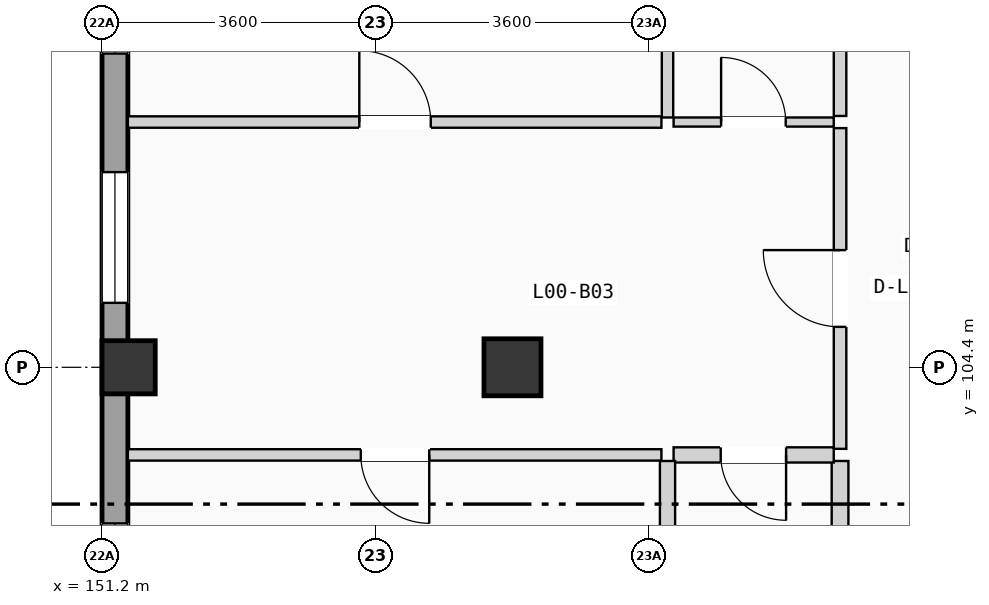
"""IFC4 building model, lengths in metres.
Left out: names, types, materials, properties, quantities, classifications, styles, units other than length and angle.
Written with IfcOpenShell. Run it as: python <this file> out.ifc"""

import sys

from ifc_helpers import new_model, si_unit, direction, frame, frame_2d, origin, origin_2d, place, context, subcontext, project, spatial, rectangle, extrude, element, fill, save


model = new_model("IFC4")
c1 = context("Model", 3, precision=1e-05, world=origin(), true_north=direction((0.0, 1.0)))
c2 = subcontext(c1, "Body", "Model", "MODEL_VIEW")
j1 = project(units=[si_unit("LENGTHUNIT", "METRE"), si_unit("PLANEANGLEUNIT", "RADIAN")], contexts=[c1])
p1 = place(None, origin())
s1 = spatial("IfcSite", under=j1, at=p1, CompositionType="ELEMENT")
p2 = place(p1, origin())
s2 = spatial("IfcBuilding", under=s1, at=p2, CompositionType="ELEMENT")
p3 = place(p2, origin())
s3 = spatial("IfcBuildingStorey", under=s2, at=p3, CompositionType="ELEMENT", Elevation=0.0)
p4 = place(p3, frame((151.55, 104.4, 0.0), z_axis=(0.0, 0.0, 1.0), x_axis=(1.0, 0.0, 0.0)))
e1 = element("IfcColumn", 1, at=p4, inside=s3, PredefinedType="COLUMN", context=c2, shape_type="SweptSolid", body=[
    extrude(rectangle(XDim=0.7, YDim=0.7, at=origin_2d()), origin(), (0.0, 0.0, 1.0), 4.9),
])
p5 = place(p3, frame((156.6, 104.4, 0.0), z_axis=(0.0, 0.0, 1.0), x_axis=(1.0, 0.0, 0.0)))
e2 = element("IfcColumn", 2, at=p5, inside=s3, PredefinedType="COLUMN", context=c2, shape_type="SweptSolid", body=[
    extrude(rectangle(XDim=0.75, YDim=0.75, at=origin_2d()), origin(), (0.0, 0.0, 1.0), 4.9),
])
p6 = place(p3, frame((151.37, 68.74, 0.0), z_axis=(0.0, 0.0, 1.0), x_axis=(0.0, 1.0, 0.0)))
e3 = element("IfcWall", 3, at=p6, inside=s3, PredefinedType="SOLIDWALL", context=c2, shape_type="SweptSolid", body=[
    extrude(rectangle(XDim=49.72, YDim=0.34, at=frame_2d((24.86, 0.0))), origin(), (0.0, 0.0, 1.0), 4.64),
])
p7 = place(p6, frame((11.552, 0.0, 0.9)))
e4 = element("IfcOpeningElement", 4, at=p7, cuts=e3, PredefinedType="OPENING", context=c2, shape_type="SweptSolid", body=[
    extrude(rectangle(XDim=1.6, YDim=1.65, at=frame_2d((0.8, 0.825))), frame((0.0, 0.18, 0.0), z_axis=(0.0, -1.0, 0.0), x_axis=(1.0, 0.0, 0.0)), (0.0, 0.0, 1.0), 0.36),
])
p8 = place(p6, frame((8.207, 0.0, 0.9)))
e5 = element("IfcOpeningElement", 5, at=p8, cuts=e3, PredefinedType="OPENING", context=c2, shape_type="SweptSolid", body=[
    extrude(rectangle(XDim=1.6, YDim=1.8, at=frame_2d((0.8, 0.9))), frame((0.0, 0.18, 0.0), z_axis=(0.0, -1.0, 0.0), x_axis=(1.0, 0.0, 0.0)), (0.0, 0.0, 1.0), 0.36),
])
p9 = place(p6, frame((16.18, 0.0, 0.9)))
e6 = element("IfcOpeningElement", 6, at=p9, cuts=e3, PredefinedType="OPENING", context=c2, shape_type="SweptSolid", body=[
    extrude(rectangle(XDim=1.72, YDim=1.2, at=frame_2d((0.86, 0.6))), frame((0.0, 0.18, 0.0), z_axis=(0.0, -1.0, 0.0), x_axis=(1.0, 0.0, 0.0)), (0.0, 0.0, 1.0), 0.36),
])
p10 = place(p6, frame((24.0, 0.0, 0.9)))
e7 = element("IfcOpeningElement", 7, at=p10, cuts=e3, PredefinedType="OPENING", context=c2, shape_type="SweptSolid", body=[
    extrude(rectangle(XDim=1.72, YDim=1.35, at=frame_2d((0.86, 0.675))), frame((0.0, 0.18, 0.0), z_axis=(0.0, -1.0, 0.0), x_axis=(1.0, 0.0, 0.0)), (0.0, 0.0, 1.0), 0.36),
])
p11 = place(p6, frame((19.503, 0.0, 0.85)))
e8 = element("IfcOpeningElement", 8, at=p11, cuts=e3, PredefinedType="OPENING", context=c2, shape_type="SweptSolid", body=[
    extrude(rectangle(XDim=0.95, YDim=1.2, at=frame_2d((0.475, 0.6))), frame((0.0, 0.18, 0.0), z_axis=(0.0, -1.0, 0.0), x_axis=(1.0, 0.0, 0.0)), (0.0, 0.0, 1.0), 0.36),
])
p12 = place(p6, frame((29.267, 0.0, 0.85)))
e9 = element("IfcOpeningElement", 9, at=p12, cuts=e3, PredefinedType="OPENING", context=c2, shape_type="SweptSolid", body=[
    extrude(rectangle(XDim=0.95, YDim=1.2, at=frame_2d((0.475, 0.6))), frame((0.0, 0.18, 0.0), z_axis=(0.0, -1.0, 0.0), x_axis=(1.0, 0.0, 0.0)), (0.0, 0.0, 1.0), 0.36),
])
p13 = place(p6, frame((36.508, 0.0, 0.9)))
e10 = element("IfcOpeningElement", 10, at=p13, cuts=e3, PredefinedType="OPENING", context=c2, shape_type="SweptSolid", body=[
    extrude(rectangle(XDim=1.72, YDim=1.8, at=frame_2d((0.86, 0.9))), frame((0.0, 0.18, 0.0), z_axis=(0.0, -1.0, 0.0), x_axis=(1.0, 0.0, 0.0)), (0.0, 0.0, 1.0), 0.36),
])
p14 = place(p6, frame((31.756, 0.0, 0.9)))
e11 = element("IfcOpeningElement", 11, at=p14, cuts=e3, PredefinedType="OPENING", context=c2, shape_type="SweptSolid", body=[
    extrude(rectangle(XDim=1.85, YDim=1.2, at=frame_2d((0.925, 0.6))), frame((0.0, 0.18, 0.0), z_axis=(0.0, -1.0, 0.0), x_axis=(1.0, 0.0, 0.0)), (0.0, 0.0, 1.0), 0.36),
])
p15 = place(p6, frame((39.788, 0.0, 0.9)))
e12 = element("IfcOpeningElement", 12, at=p15, cuts=e3, PredefinedType="OPENING", context=c2, shape_type="SweptSolid", body=[
    extrude(rectangle(XDim=1.85, YDim=1.35, at=frame_2d((0.925, 0.675))), frame((0.0, 0.18, 0.0), z_axis=(0.0, -1.0, 0.0), x_axis=(1.0, 0.0, 0.0)), (0.0, 0.0, 1.0), 0.36),
])
p16 = place(p3, frame((160.91, 103.327, 0.0), z_axis=(0.0, 0.0, 1.0), x_axis=(0.0, 1.0, 0.0)))
e13 = element("IfcWall", 13, at=p16, inside=s3, PredefinedType="PARTITIONING", context=c2, shape_type="SweptSolid", body=[
    extrude(rectangle(XDim=4.22, YDim=0.165, at=frame_2d((2.11, 0.0))), origin(), (0.0, 0.0, 1.0), 3.84),
])
p17 = place(p16, frame((1.605, 0.0, 0.0)))
e14 = element("IfcOpeningElement", 14, at=p17, cuts=e13, PredefinedType="OPENING", context=c2, shape_type="SweptSolid", body=[
    extrude(rectangle(XDim=1.01, YDim=2.11, at=frame_2d((0.505, 1.055))), frame((0.0, 0.093, 0.0), z_axis=(0.0, -1.0, 0.0), x_axis=(1.0, 0.0, 0.0)), (0.0, 0.0, 1.0), 0.185),
])
p18 = place(p3, frame((160.91, 99.674, 0.0), z_axis=(0.0, 0.0, 1.0), x_axis=(0.0, 1.0, 0.0)))
e15 = element("IfcWall", 15, at=p18, inside=s3, PredefinedType="PLUMBINGWALL", context=c2, shape_type="SweptSolid", body=[
    extrude(rectangle(XDim=3.493, YDim=0.22, at=frame_2d((1.747, 0.0))), origin(), (0.0, 0.0, 1.0), 3.84),
])
p19 = place(p3, frame((160.91, 107.707, 0.0), z_axis=(0.0, 0.0, 1.0), x_axis=(0.0, 1.0, 0.0)))
e16 = element("IfcWall", 16, at=p19, inside=s3, PredefinedType="PARTITIONING", context=c2, shape_type="SweptSolid", body=[
    extrude(rectangle(XDim=3.493, YDim=0.165, at=frame_2d((1.747, 0.0))), origin(), (0.0, 0.0, 1.0), 3.84),
])
p20 = place(p3, frame((158.72, 103.247, 0.0), z_axis=(0.0, 0.0, 1.0), x_axis=(1.0, 0.0, 0.0)))
e17 = element("IfcWall", 17, at=p20, inside=s3, PredefinedType="PLUMBINGWALL", context=c2, shape_type="SweptSolid", body=[
    extrude(rectangle(XDim=2.107, YDim=0.2, at=frame_2d((1.053, 0.0))), origin(), (0.0, 0.0, 1.0), 3.84),
])
p21 = place(p20, frame((0.62, 0.0, 0.0)))
e18 = element("IfcOpeningElement", 18, at=p21, cuts=e17, PredefinedType="OPENING", context=c2, shape_type="SweptSolid", body=[
    extrude(rectangle(XDim=0.86, YDim=2.0, at=frame_2d((0.43, 1.0))), frame((0.0, 0.11, 0.0), z_axis=(0.0, -1.0, 0.0), x_axis=(1.0, 0.0, 0.0)), (0.0, 0.0, 1.0), 0.22),
])
p22 = place(p3, frame((158.72, 107.627, 0.0), z_axis=(0.0, 0.0, 1.0), x_axis=(1.0, 0.0, 0.0)))
e19 = element("IfcWall", 19, at=p22, inside=s3, PredefinedType="PARTITIONING", context=c2, shape_type="SweptSolid", body=[
    extrude(rectangle(XDim=2.107, YDim=0.12, at=frame_2d((1.053, 0.0))), origin(), (0.0, 0.0, 1.0), 3.84),
])
p23 = place(p22, frame((0.625, 0.0, 0.0)))
e20 = element("IfcOpeningElement", 20, at=p23, cuts=e19, PredefinedType="OPENING", context=c2, shape_type="SweptSolid", body=[
    extrude(rectangle(XDim=0.85, YDim=2.01, at=frame_2d((0.425, 1.005))), frame((0.0, 0.07, 0.0), z_axis=(0.0, -1.0, 0.0), x_axis=(1.0, 0.0, 0.0)), (0.0, 0.0, 1.0), 0.14),
])
p24 = place(p3, frame((151.54, 103.247, 0.0), z_axis=(0.0, 0.0, 1.0), x_axis=(1.0, 0.0, 0.0)))
e21 = element("IfcWall", 21, at=p24, inside=s3, PredefinedType="PARTITIONING", context=c2, shape_type="SweptSolid", body=[
    extrude(rectangle(XDim=7.02, YDim=0.15, at=frame_2d((3.51, 0.0))), origin(), (0.0, 0.0, 1.0), 3.84),
])
p25 = place(p24, frame((3.065, 0.0, 0.0)))
e22 = element("IfcOpeningElement", 22, at=p25, cuts=e21, PredefinedType="OPENING", context=c2, shape_type="SweptSolid", body=[
    extrude(rectangle(XDim=0.9, YDim=2.04, at=frame_2d((0.45, 1.02))), frame((0.0, 0.085, 0.0), z_axis=(0.0, -1.0, 0.0), x_axis=(1.0, 0.0, 0.0)), (0.0, 0.0, 1.0), 0.17),
])
p26 = place(p3, frame((151.54, 107.627, 0.0), z_axis=(0.0, 0.0, 1.0), x_axis=(1.0, 0.0, 0.0)))
e23 = element("IfcWall", 23, at=p26, inside=s3, PredefinedType="PARTITIONING", context=c2, shape_type="SweptSolid", body=[
    extrude(rectangle(XDim=7.02, YDim=0.15, at=frame_2d((3.51, 0.0))), origin(), (0.0, 0.0, 1.0), 3.84),
])
p27 = place(p26, frame((3.045, 0.0, 0.0)))
e24 = element("IfcOpeningElement", 24, at=p27, cuts=e23, PredefinedType="OPENING", context=c2, shape_type="SweptSolid", body=[
    extrude(rectangle(XDim=0.94, YDim=2.06, at=frame_2d((0.47, 1.03))), frame((0.0, 0.085, 0.0), z_axis=(0.0, -1.0, 0.0), x_axis=(1.0, 0.0, 0.0)), (0.0, 0.0, 1.0), 0.17),
])
p28 = place(p3, frame((158.64, 99.674, 0.0), z_axis=(0.0, 0.0, 1.0), x_axis=(0.0, 1.0, 0.0)))
e25 = element("IfcWall", 25, at=p28, inside=s3, PredefinedType="PLUMBINGWALL", context=c2, shape_type="SweptSolid", body=[
    extrude(rectangle(XDim=3.493, YDim=0.2, at=frame_2d((1.747, 0.0))), origin(), (0.0, 0.0, 1.0), 3.84),
])
p29 = place(p3, frame((158.64, 107.687, 0.0), z_axis=(0.0, 0.0, 1.0), x_axis=(0.0, 1.0, 0.0)))
e26 = element("IfcWall", 26, at=p29, inside=s3, PredefinedType="PARTITIONING", context=c2, shape_type="SweptSolid", body=[
    extrude(rectangle(XDim=3.513, YDim=0.15, at=frame_2d((1.756, 0.0))), origin(), (0.0, 0.0, 1.0), 3.84),
])
p30 = place(p13, origin())
e27 = element("IfcWindow", 27, at=p30, inside=s3, PartitioningType="DOUBLE_PANEL_VERTICAL", PredefinedType="WINDOW", context=c2, shape_type="SweptSolid", body=[
    extrude(rectangle(XDim=1.72, YDim=1.8, at=frame_2d((0.86, 0.9))), frame((0.0, 0.03, 0.0), z_axis=(0.0, -1.0, 0.0), x_axis=(1.0, 0.0, 0.0)), (0.0, 0.0, 1.0), 0.06),
])
fill(e10, e27)
p31 = place(p14, origin())
e28 = element("IfcWindow", 28, at=p31, inside=s3, PartitioningType="DOUBLE_PANEL_VERTICAL", PredefinedType="WINDOW", context=c2, shape_type="SweptSolid", body=[
    extrude(rectangle(XDim=1.85, YDim=1.2, at=frame_2d((0.925, 0.6))), frame((0.0, 0.03, 0.0), z_axis=(0.0, -1.0, 0.0), x_axis=(1.0, 0.0, 0.0)), (0.0, 0.0, 1.0), 0.06),
])
fill(e11, e28)
p32 = place(p15, origin())
e29 = element("IfcWindow", 29, at=p32, inside=s3, PartitioningType="DOUBLE_PANEL_VERTICAL", PredefinedType="WINDOW", context=c2, shape_type="SweptSolid", body=[
    extrude(rectangle(XDim=1.85, YDim=1.35, at=frame_2d((0.925, 0.675))), frame((0.0, 0.03, 0.0), z_axis=(0.0, -1.0, 0.0), x_axis=(1.0, 0.0, 0.0)), (0.0, 0.0, 1.0), 0.06),
])
fill(e12, e29)
p33 = place(p17, origin())
e30 = element("IfcDoor", 30, at=p33, inside=s3, OperationType="SINGLE_SWING_RIGHT", PredefinedType="DOOR", context=c2, shape_type="SweptSolid", body=[
    extrude(rectangle(XDim=1.01, YDim=2.11, at=frame_2d((0.505, 1.055))), frame((0.0, 0.025, 0.0), z_axis=(0.0, -1.0, 0.0), x_axis=(1.0, 0.0, 0.0)), (0.0, 0.0, 1.0), 0.05),
])
fill(e14, e30)
p34 = place(p21, frame((0.86, 0.0, 0.0), z_axis=(0.0, 0.0, 1.0), x_axis=(-1.0, 0.0, 0.0)))
e31 = element("IfcDoor", 31, at=p34, inside=s3, OperationType="SINGLE_SWING_RIGHT", PredefinedType="DOOR", context=c2, shape_type="SweptSolid", body=[
    extrude(rectangle(XDim=0.86, YDim=2.0, at=frame_2d((0.43, 1.0))), frame((0.0, 0.025, 0.0), z_axis=(0.0, -1.0, 0.0), x_axis=(1.0, 0.0, 0.0)), (0.0, 0.0, 1.0), 0.05),
])
fill(e18, e31)
p35 = place(p23, origin())
e32 = element("IfcDoor", 32, at=p35, inside=s3, OperationType="SINGLE_SWING_LEFT", PredefinedType="DOOR", context=c2, shape_type="SweptSolid", body=[
    extrude(rectangle(XDim=0.85, YDim=2.01, at=frame_2d((0.425, 1.005))), frame((0.0, 0.025, 0.0), z_axis=(0.0, -1.0, 0.0), x_axis=(1.0, 0.0, 0.0)), (0.0, 0.0, 1.0), 0.05),
])
fill(e20, e32)
p36 = place(p25, frame((0.9, 0.0, 0.0), z_axis=(0.0, 0.0, 1.0), x_axis=(-1.0, 0.0, 0.0)))
e33 = element("IfcDoor", 33, at=p36, inside=s3, OperationType="SINGLE_SWING_RIGHT", PredefinedType="DOOR", context=c2, shape_type="SweptSolid", body=[
    extrude(rectangle(XDim=0.9, YDim=2.04, at=frame_2d((0.45, 1.02))), frame((0.0, 0.025, 0.0), z_axis=(0.0, -1.0, 0.0), x_axis=(1.0, 0.0, 0.0)), (0.0, 0.0, 1.0), 0.05),
])
fill(e22, e33)
p37 = place(p27, origin())
e34 = element("IfcDoor", 34, at=p37, inside=s3, OperationType="SINGLE_SWING_LEFT", PredefinedType="DOOR", context=c2, shape_type="SweptSolid", body=[
    extrude(rectangle(XDim=0.94, YDim=2.06, at=frame_2d((0.47, 1.03))), frame((0.0, 0.025, 0.0), z_axis=(0.0, -1.0, 0.0), x_axis=(1.0, 0.0, 0.0)), (0.0, 0.0, 1.0), 0.05),
])
fill(e24, e34)
save(model, sys.argv[1])
